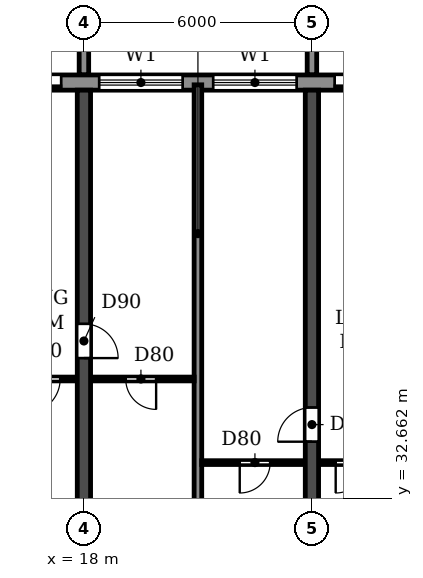
"""IFC4 building model, lengths in metres.
Left out: names, types, materials, properties, quantities, classifications, styles, units other than length and angle.
Written with IfcOpenShell. Run it as: python <this file> out.ifc"""

import sys

from ifc_helpers import new_model, si_unit, direction, frame, frame_2d, origin, place, context, subcontext, project, spatial, polyline, rectangle, outline, extrude, source, transform, mapped, element, fill, save


model = new_model("IFC4")
c1 = context("Model", 3, precision=1e-05, world=origin(), true_north=direction((0.0, 1.0)))
c2 = subcontext(c1, "Body", "Model", "MODEL_VIEW")
j1 = project(units=[si_unit("LENGTHUNIT", "METRE"), si_unit("PLANEANGLEUNIT", "RADIAN")], contexts=[c1])
p1 = place(None, origin())
s1 = spatial("IfcSite", under=j1, at=p1, CompositionType="ELEMENT")
p2 = place(p1, origin())
s2 = spatial("IfcBuilding", under=s1, at=p2, CompositionType="ELEMENT")
p3 = place(p2, frame((0.0, 0.0, 102.6)))
s3 = spatial("IfcBuildingStorey", under=s2, at=p3, CompositionType="ELEMENT", Elevation=102.6)
p4 = place(p3, frame((18.0, 30.525, 0.0), z_axis=(0.0, 0.0, 1.0), x_axis=(0.0, 1.0, 0.0)))
e1 = element("IfcWall", 1, at=p4, inside=s3, PredefinedType="SHEAR", context=c2, shape_type="SweptSolid", body=[
    extrude(rectangle(XDim=12.875, YDim=0.35, at=frame_2d((6.438, 0.0))), origin(), (0.0, 0.0, 1.0), 3.0),
])
p5 = place(p4, frame((5.825, 0.0, 0.0)))
e2 = element("IfcOpeningElement", 2, at=p5, cuts=e1, PredefinedType="OPENING", context=c2, shape_type="SweptSolid", body=[
    extrude(rectangle(XDim=0.9, YDim=2.1, at=frame_2d((0.45, 1.05))), frame((0.0, 0.185, 0.0), z_axis=(0.0, -1.0, 0.0), x_axis=(1.0, 0.0, 0.0)), (0.0, 0.0, 1.0), 0.37),
])
p6 = place(p3, frame((24.0, 30.525, 0.0), z_axis=(0.0, 0.0, 1.0), x_axis=(0.0, 1.0, 0.0)))
e3 = element("IfcWall", 3, at=p6, inside=s3, PredefinedType="SHEAR", context=c2, shape_type="SweptSolid", body=[
    extrude(rectangle(XDim=12.875, YDim=0.35, at=frame_2d((6.438, 0.0))), origin(), (0.0, 0.0, 1.0), 3.0),
])
p7 = place(p6, frame((3.625, 0.0, 0.0)))
e4 = element("IfcOpeningElement", 4, at=p7, cuts=e3, PredefinedType="OPENING", context=c2, shape_type="SweptSolid", body=[
    extrude(rectangle(XDim=0.9, YDim=2.1, at=frame_2d((0.45, 1.05))), frame((0.0, 0.185, 0.0), z_axis=(0.0, -1.0, 0.0), x_axis=(1.0, 0.0, 0.0)), (0.0, 0.0, 1.0), 0.37),
])
p8 = place(p3, frame((91.317, 43.6, 0.0), z_axis=(0.0, 0.0, 1.0), x_axis=(-1.0, 0.0, 0.0)))
e5 = element("IfcWall", 5, at=p8, inside=s3, PredefinedType="STANDARD", context=c2, shape_type="SweptSolid", body=[
    extrude(rectangle(XDim=80.634, YDim=0.4, at=frame_2d((40.317, 0.0))), origin(), (0.0, 0.0, 1.0), 3.0),
])
p9 = place(p8, frame((76.717, 0.0, 0.9)))
e6 = element("IfcOpeningElement", 6, at=p9, cuts=e5, PredefinedType="OPENING", context=c2, shape_type="SweptSolid", body=[
    extrude(rectangle(XDim=2.2, YDim=1.5, at=frame_2d((1.1, 0.75))), frame((0.0, 0.21, 0.0), z_axis=(0.0, -1.0, 0.0), x_axis=(1.0, 0.0, 0.0)), (0.0, 0.0, 1.0), 0.42),
])
p10 = place(p8, frame((73.917, 0.0, 0.0)))
e7 = element("IfcOpeningElement", 7, at=p10, cuts=e5, PredefinedType="OPENING", context=c2, shape_type="SweptSolid", body=[
    extrude(rectangle(XDim=1.8, YDim=2.4, at=frame_2d((0.9, 1.2))), frame((0.0, 0.21, 0.0), z_axis=(0.0, -1.0, 0.0), x_axis=(1.0, 0.0, 0.0)), (0.0, 0.0, 1.0), 0.42),
])
p11 = place(p8, frame((70.717, 0.0, 0.9)))
e8 = element("IfcOpeningElement", 8, at=p11, cuts=e5, PredefinedType="OPENING", context=c2, shape_type="SweptSolid", body=[
    extrude(rectangle(XDim=2.2, YDim=1.5, at=frame_2d((1.1, 0.75))), frame((0.0, 0.21, 0.0), z_axis=(0.0, -1.0, 0.0), x_axis=(1.0, 0.0, 0.0)), (0.0, 0.0, 1.0), 0.42),
])
p12 = place(p8, frame((67.717, 0.0, 0.9)))
e9 = element("IfcOpeningElement", 9, at=p12, cuts=e5, PredefinedType="OPENING", context=c2, shape_type="SweptSolid", body=[
    extrude(rectangle(XDim=2.2, YDim=1.5, at=frame_2d((1.1, 0.75))), frame((0.0, 0.21, 0.0), z_axis=(0.0, -1.0, 0.0), x_axis=(1.0, 0.0, 0.0)), (0.0, 0.0, 1.0), 0.42),
])
p13 = place(p8, frame((64.917, 0.0, 0.0)))
e10 = element("IfcOpeningElement", 10, at=p13, cuts=e5, PredefinedType="OPENING", context=c2, shape_type="SweptSolid", body=[
    extrude(rectangle(XDim=1.8, YDim=2.4, at=frame_2d((0.9, 1.2))), frame((0.0, 0.21, 0.0), z_axis=(0.0, -1.0, 0.0), x_axis=(1.0, 0.0, 0.0)), (0.0, 0.0, 1.0), 0.42),
])
p14 = place(p8, frame((61.717, 0.0, 0.9)))
e11 = element("IfcOpeningElement", 11, at=p14, cuts=e5, PredefinedType="OPENING", context=c2, shape_type="SweptSolid", body=[
    extrude(rectangle(XDim=2.2, YDim=1.5, at=frame_2d((1.1, 0.75))), frame((0.0, 0.21, 0.0), z_axis=(0.0, -1.0, 0.0), x_axis=(1.0, 0.0, 0.0)), (0.0, 0.0, 1.0), 0.42),
])
p15 = place(p8, frame((58.717, 0.0, 0.9)))
e12 = element("IfcOpeningElement", 12, at=p15, cuts=e5, PredefinedType="OPENING", context=c2, shape_type="SweptSolid", body=[
    extrude(rectangle(XDim=2.2, YDim=1.5, at=frame_2d((1.1, 0.75))), frame((0.0, 0.21, 0.0), z_axis=(0.0, -1.0, 0.0), x_axis=(1.0, 0.0, 0.0)), (0.0, 0.0, 1.0), 0.42),
])
p16 = place(p8, frame((55.717, 0.0, 0.9)))
e13 = element("IfcOpeningElement", 13, at=p16, cuts=e5, PredefinedType="OPENING", context=c2, shape_type="SweptSolid", body=[
    extrude(rectangle(XDim=2.2, YDim=1.5, at=frame_2d((1.1, 0.75))), frame((0.0, 0.21, 0.0), z_axis=(0.0, -1.0, 0.0), x_axis=(1.0, 0.0, 0.0)), (0.0, 0.0, 1.0), 0.42),
])
p17 = place(p8, frame((52.717, 0.0, 0.9)))
e14 = element("IfcOpeningElement", 14, at=p17, cuts=e5, PredefinedType="OPENING", context=c2, shape_type="SweptSolid", body=[
    extrude(rectangle(XDim=2.2, YDim=1.5, at=frame_2d((1.1, 0.75))), frame((0.0, 0.21, 0.0), z_axis=(0.0, -1.0, 0.0), x_axis=(1.0, 0.0, 0.0)), (0.0, 0.0, 1.0), 0.42),
])
p18 = place(p8, frame((49.917, 0.0, 0.0)))
e15 = element("IfcOpeningElement", 15, at=p18, cuts=e5, PredefinedType="OPENING", context=c2, shape_type="SweptSolid", body=[
    extrude(rectangle(XDim=1.8, YDim=2.4, at=frame_2d((0.9, 1.2))), frame((0.0, 0.21, 0.0), z_axis=(0.0, -1.0, 0.0), x_axis=(1.0, 0.0, 0.0)), (0.0, 0.0, 1.0), 0.42),
])
p19 = place(p8, frame((46.717, 0.0, 0.9)))
e16 = element("IfcOpeningElement", 16, at=p19, cuts=e5, PredefinedType="OPENING", context=c2, shape_type="SweptSolid", body=[
    extrude(rectangle(XDim=2.2, YDim=1.5, at=frame_2d((1.1, 0.75))), frame((0.0, 0.21, 0.0), z_axis=(0.0, -1.0, 0.0), x_axis=(1.0, 0.0, 0.0)), (0.0, 0.0, 1.0), 0.42),
])
p20 = place(p8, frame((43.917, 0.0, 0.0)))
e17 = element("IfcOpeningElement", 17, at=p20, cuts=e5, PredefinedType="OPENING", context=c2, shape_type="SweptSolid", body=[
    extrude(rectangle(XDim=1.8, YDim=2.4, at=frame_2d((0.9, 1.2))), frame((0.0, 0.21, 0.0), z_axis=(0.0, -1.0, 0.0), x_axis=(1.0, 0.0, 0.0)), (0.0, 0.0, 1.0), 0.42),
])
p21 = place(p8, frame((40.717, 0.0, 0.9)))
e18 = element("IfcOpeningElement", 18, at=p21, cuts=e5, PredefinedType="OPENING", context=c2, shape_type="SweptSolid", body=[
    extrude(rectangle(XDim=2.2, YDim=1.5, at=frame_2d((1.1, 0.75))), frame((0.0, 0.21, 0.0), z_axis=(0.0, -1.0, 0.0), x_axis=(1.0, 0.0, 0.0)), (0.0, 0.0, 1.0), 0.42),
])
p22 = place(p8, frame((37.717, 0.0, 0.9)))
e19 = element("IfcOpeningElement", 19, at=p22, cuts=e5, PredefinedType="OPENING", context=c2, shape_type="SweptSolid", body=[
    extrude(rectangle(XDim=2.2, YDim=1.5, at=frame_2d((1.1, 0.75))), frame((0.0, 0.21, 0.0), z_axis=(0.0, -1.0, 0.0), x_axis=(1.0, 0.0, 0.0)), (0.0, 0.0, 1.0), 0.42),
])
p23 = place(p8, frame((34.917, 0.0, 0.0)))
e20 = element("IfcOpeningElement", 20, at=p23, cuts=e5, PredefinedType="OPENING", context=c2, shape_type="SweptSolid", body=[
    extrude(rectangle(XDim=1.8, YDim=2.4, at=frame_2d((0.9, 1.2))), frame((0.0, 0.21, 0.0), z_axis=(0.0, -1.0, 0.0), x_axis=(1.0, 0.0, 0.0)), (0.0, 0.0, 1.0), 0.42),
])
p24 = place(p8, frame((31.717, 0.0, 0.9)))
e21 = element("IfcOpeningElement", 21, at=p24, cuts=e5, PredefinedType="OPENING", context=c2, shape_type="SweptSolid", body=[
    extrude(rectangle(XDim=2.2, YDim=1.5, at=frame_2d((1.1, 0.75))), frame((0.0, 0.21, 0.0), z_axis=(0.0, -1.0, 0.0), x_axis=(1.0, 0.0, 0.0)), (0.0, 0.0, 1.0), 0.42),
])
p25 = place(p8, frame((28.717, 0.0, 0.9)))
e22 = element("IfcOpeningElement", 22, at=p25, cuts=e5, PredefinedType="OPENING", context=c2, shape_type="SweptSolid", body=[
    extrude(rectangle(XDim=2.2, YDim=1.5, at=frame_2d((1.1, 0.75))), frame((0.0, 0.21, 0.0), z_axis=(0.0, -1.0, 0.0), x_axis=(1.0, 0.0, 0.0)), (0.0, 0.0, 1.0), 0.42),
])
p26 = place(p8, frame((25.917, 0.0, 0.0)))
e23 = element("IfcOpeningElement", 23, at=p26, cuts=e5, PredefinedType="OPENING", context=c2, shape_type="SweptSolid", body=[
    extrude(rectangle(XDim=1.8, YDim=2.4, at=frame_2d((0.9, 1.2))), frame((0.0, 0.21, 0.0), z_axis=(0.0, -1.0, 0.0), x_axis=(1.0, 0.0, 0.0)), (0.0, 0.0, 1.0), 0.42),
])
p27 = place(p8, frame((22.717, 0.0, 0.9)))
e24 = element("IfcOpeningElement", 24, at=p27, cuts=e5, PredefinedType="OPENING", context=c2, shape_type="SweptSolid", body=[
    extrude(rectangle(XDim=2.2, YDim=1.5, at=frame_2d((1.1, 0.75))), frame((0.0, 0.21, 0.0), z_axis=(0.0, -1.0, 0.0), x_axis=(1.0, 0.0, 0.0)), (0.0, 0.0, 1.0), 0.42),
])
p28 = place(p8, frame((19.717, 0.0, 0.9)))
e25 = element("IfcOpeningElement", 25, at=p28, cuts=e5, PredefinedType="OPENING", context=c2, shape_type="SweptSolid", body=[
    extrude(rectangle(XDim=2.2, YDim=1.5, at=frame_2d((1.1, 0.75))), frame((0.0, 0.21, 0.0), z_axis=(0.0, -1.0, 0.0), x_axis=(1.0, 0.0, 0.0)), (0.0, 0.0, 1.0), 0.42),
])
p29 = place(p8, frame((16.917, 0.0, 0.0)))
e26 = element("IfcOpeningElement", 26, at=p29, cuts=e5, PredefinedType="OPENING", context=c2, shape_type="SweptSolid", body=[
    extrude(rectangle(XDim=1.8, YDim=2.4, at=frame_2d((0.9, 1.2))), frame((0.0, 0.21, 0.0), z_axis=(0.0, -1.0, 0.0), x_axis=(1.0, 0.0, 0.0)), (0.0, 0.0, 1.0), 0.42),
])
p30 = place(p8, frame((13.717, 0.0, 0.9)))
e27 = element("IfcOpeningElement", 27, at=p30, cuts=e5, PredefinedType="OPENING", context=c2, shape_type="SweptSolid", body=[
    extrude(rectangle(XDim=2.2, YDim=1.5, at=frame_2d((1.1, 0.75))), frame((0.0, 0.21, 0.0), z_axis=(0.0, -1.0, 0.0), x_axis=(1.0, 0.0, 0.0)), (0.0, 0.0, 1.0), 0.42),
])
p31 = place(p8, frame((10.917, 0.0, 0.0)))
e28 = element("IfcOpeningElement", 28, at=p31, cuts=e5, PredefinedType="OPENING", context=c2, shape_type="SweptSolid", body=[
    extrude(rectangle(XDim=1.8, YDim=2.4, at=frame_2d((0.9, 1.2))), frame((0.0, 0.21, 0.0), z_axis=(0.0, -1.0, 0.0), x_axis=(1.0, 0.0, 0.0)), (0.0, 0.0, 1.0), 0.42),
])
p32 = place(p8, frame((7.717, 0.0, 0.9)))
e29 = element("IfcOpeningElement", 29, at=p32, cuts=e5, PredefinedType="OPENING", context=c2, shape_type="SweptSolid", body=[
    extrude(rectangle(XDim=2.2, YDim=1.5, at=frame_2d((1.1, 0.75))), frame((0.0, 0.21, 0.0), z_axis=(0.0, -1.0, 0.0), x_axis=(1.0, 0.0, 0.0)), (0.0, 0.0, 1.0), 0.42),
])
p33 = place(p8, frame((4.717, 0.0, 0.9)))
e30 = element("IfcOpeningElement", 30, at=p33, cuts=e5, PredefinedType="OPENING", context=c2, shape_type="SweptSolid", body=[
    extrude(rectangle(XDim=2.2, YDim=1.5, at=frame_2d((1.1, 0.75))), frame((0.0, 0.21, 0.0), z_axis=(0.0, -1.0, 0.0), x_axis=(1.0, 0.0, 0.0)), (0.0, 0.0, 1.0), 0.42),
])
p34 = place(p8, frame((1.917, 0.0, 0.0)))
e31 = element("IfcOpeningElement", 31, at=p34, cuts=e5, PredefinedType="OPENING", context=c2, shape_type="SweptSolid", body=[
    extrude(rectangle(XDim=1.8, YDim=2.4, at=frame_2d((0.9, 1.2))), frame((0.0, 0.21, 0.0), z_axis=(0.0, -1.0, 0.0), x_axis=(1.0, 0.0, 0.0)), (0.0, 0.0, 1.0), 0.42),
])
m1 = source(origin(), c2, "Body", "SweptSolid", [
    extrude(outline(polyline([(0.0, 0.0), (0.25, 0.0), (0.25, 3.1), (0.0, 3.1), (0.0, 0.0)])), origin(), (0.0, 0.0, 1.0), 3.1),
])
for number, where in (
    (32, (17.875, 43.8, 0.0)),
    (33, (23.875, 43.8, 0.0)),
):
    element("IfcWall", number, at=place(p3, frame(where)), inside=s3, PredefinedType="STANDARD", context=c2, shape_type="MappedRepresentation", body=[
        mapped(m1, transform((0.0, 0.0, 0.0))),
    ])
p35 = place(p3, frame((21.0, 30.535, 0.0), z_axis=(0.0, 0.0, 1.0), x_axis=(0.0, 1.0, 0.0)))
e34 = element("IfcWall", 34, at=p35, inside=s3, PredefinedType="PARTITIONING", context=c2, shape_type="SweptSolid", body=[
    extrude(rectangle(XDim=13.005, YDim=0.2, at=frame_2d((6.502, 0.0))), origin(), (0.0, 0.0, 1.0), 3.0),
])
p36 = place(p3, frame((21.1, 33.6, 0.0), z_axis=(0.0, 0.0, 1.0), x_axis=(1.0, 0.0, 0.0)))
e35 = element("IfcWall", 35, at=p36, inside=s3, PredefinedType="PARTITIONING", context=c2, shape_type="SweptSolid", body=[
    extrude(rectangle(XDim=2.715, YDim=0.1, at=frame_2d((1.357, 0.0))), origin(), (0.0, 0.0, 1.0), 3.0),
])
p37 = place(p36, frame((1.0, 0.0, 0.0)))
e36 = element("IfcOpeningElement", 36, at=p37, cuts=e35, PredefinedType="OPENING", context=c2, shape_type="SweptSolid", body=[
    extrude(rectangle(XDim=0.8, YDim=2.1, at=frame_2d((0.4, 1.05))), frame((0.0, 0.06, 0.0), z_axis=(0.0, -1.0, 0.0), x_axis=(1.0, 0.0, 0.0)), (0.0, 0.0, 1.0), 0.12),
])
p38 = place(p3, frame((24.185, 33.6, 0.0), z_axis=(0.0, 0.0, 1.0), x_axis=(1.0, 0.0, 0.0)))
e37 = element("IfcWall", 37, at=p38, inside=s3, PredefinedType="PARTITIONING", context=c2, shape_type="SweptSolid", body=[
    extrude(rectangle(XDim=1.915, YDim=0.1, at=frame_2d((0.958, 0.0))), origin(), (0.0, 0.0, 1.0), 3.0),
])
p39 = place(p38, frame((0.44, 0.0, 0.0)))
e38 = element("IfcOpeningElement", 38, at=p39, cuts=e37, PredefinedType="OPENING", context=c2, shape_type="SweptSolid", body=[
    extrude(rectangle(XDim=0.8, YDim=2.1, at=frame_2d((0.4, 1.05))), frame((0.0, 0.06, 0.0), z_axis=(0.0, -1.0, 0.0), x_axis=(1.0, 0.0, 0.0)), (0.0, 0.0, 1.0), 0.12),
])
p40 = place(p3, frame((15.8, 35.8, 0.0), z_axis=(0.0, 0.0, 1.0), x_axis=(1.0, 0.0, 0.0)))
e39 = element("IfcWall", 39, at=p40, inside=s3, PredefinedType="PARTITIONING", context=c2, shape_type="SweptSolid", body=[
    extrude(rectangle(XDim=2.015, YDim=0.1, at=frame_2d((1.007, 0.0))), origin(), (0.0, 0.0, 1.0), 3.0),
])
p41 = place(p40, frame((0.675, 0.0, 0.0)))
e40 = element("IfcOpeningElement", 40, at=p41, cuts=e39, PredefinedType="OPENING", context=c2, shape_type="SweptSolid", body=[
    extrude(rectangle(XDim=0.9, YDim=2.1, at=frame_2d((0.45, 1.05))), frame((0.0, 0.06, 0.0), z_axis=(0.0, -1.0, 0.0), x_axis=(1.0, 0.0, 0.0)), (0.0, 0.0, 1.0), 0.12),
])
p42 = place(p3, frame((18.185, 35.8, 0.0), z_axis=(0.0, 0.0, 1.0), x_axis=(1.0, 0.0, 0.0)))
e41 = element("IfcWall", 41, at=p42, inside=s3, PredefinedType="PARTITIONING", context=c2, shape_type="SweptSolid", body=[
    extrude(rectangle(XDim=2.715, YDim=0.1, at=frame_2d((1.357, 0.0))), origin(), (0.0, 0.0, 1.0), 3.0),
])
p43 = place(p42, frame((0.915, 0.0, 0.0)))
e42 = element("IfcOpeningElement", 42, at=p43, cuts=e41, PredefinedType="OPENING", context=c2, shape_type="SweptSolid", body=[
    extrude(rectangle(XDim=0.8, YDim=2.1, at=frame_2d((0.4, 1.05))), frame((0.0, 0.06, 0.0), z_axis=(0.0, -1.0, 0.0), x_axis=(1.0, 0.0, 0.0)), (0.0, 0.0, 1.0), 0.12),
])
p44 = place(p10, origin())
e43 = element("IfcDoor", 43, at=p44, inside=s3, OperationType="DOUBLE_DOOR_SLIDING", PredefinedType="DOOR", context=c2, shape_type="SweptSolid", body=[
    extrude(rectangle(XDim=1.8, YDim=2.4, at=frame_2d((0.9, 1.2))), frame((0.0, 0.025, 0.0), z_axis=(0.0, -1.0, 0.0), x_axis=(1.0, 0.0, 0.0)), (0.0, 0.0, 1.0), 0.05),
])
fill(e7, e43)
p45 = place(p11, origin())
e44 = element("IfcWindow", 44, at=p45, inside=s3, PartitioningType="DOUBLE_PANEL_HORIZONTAL", PredefinedType="WINDOW", context=c2, shape_type="SweptSolid", body=[
    extrude(rectangle(XDim=2.2, YDim=1.5, at=frame_2d((1.1, 0.75))), frame((0.0, 0.03, 0.0), z_axis=(0.0, -1.0, 0.0), x_axis=(1.0, 0.0, 0.0)), (0.0, 0.0, 1.0), 0.06),
])
fill(e8, e44)
p46 = place(p12, origin())
e45 = element("IfcWindow", 45, at=p46, inside=s3, PartitioningType="DOUBLE_PANEL_HORIZONTAL", PredefinedType="WINDOW", context=c2, shape_type="SweptSolid", body=[
    extrude(rectangle(XDim=2.2, YDim=1.5, at=frame_2d((1.1, 0.75))), frame((0.0, 0.03, 0.0), z_axis=(0.0, -1.0, 0.0), x_axis=(1.0, 0.0, 0.0)), (0.0, 0.0, 1.0), 0.06),
])
fill(e9, e45)
p47 = place(p13, origin())
e46 = element("IfcDoor", 46, at=p47, inside=s3, OperationType="DOUBLE_DOOR_SLIDING", PredefinedType="DOOR", context=c2, shape_type="SweptSolid", body=[
    extrude(rectangle(XDim=1.8, YDim=2.4, at=frame_2d((0.9, 1.2))), frame((0.0, 0.025, 0.0), z_axis=(0.0, -1.0, 0.0), x_axis=(1.0, 0.0, 0.0)), (0.0, 0.0, 1.0), 0.05),
])
fill(e10, e46)
p48 = place(p43, frame((0.8, 0.0, 0.0), z_axis=(0.0, 0.0, 1.0), x_axis=(-1.0, 0.0, 0.0)))
e47 = element("IfcDoor", 47, at=p48, inside=s3, OperationType="SINGLE_SWING_LEFT", PredefinedType="DOOR", context=c2, shape_type="SweptSolid", body=[
    extrude(rectangle(XDim=0.8, YDim=2.1, at=frame_2d((0.4, 1.05))), frame((0.0, 0.025, 0.0), z_axis=(0.0, -1.0, 0.0), x_axis=(1.0, 0.0, 0.0)), (0.0, 0.0, 1.0), 0.05),
])
fill(e42, e47)
p49 = place(p41, frame((0.9, 0.0, 0.0), z_axis=(0.0, 0.0, 1.0), x_axis=(-1.0, 0.0, 0.0)))
e48 = element("IfcDoor", 48, at=p49, inside=s3, OperationType="SINGLE_SWING_RIGHT", PredefinedType="DOOR", context=c2, shape_type="SweptSolid", body=[
    extrude(rectangle(XDim=0.9, YDim=2.1, at=frame_2d((0.45, 1.05))), frame((0.0, 0.025, 0.0), z_axis=(0.0, -1.0, 0.0), x_axis=(1.0, 0.0, 0.0)), (0.0, 0.0, 1.0), 0.05),
])
fill(e40, e48)
p50 = place(p5, frame((0.9, 0.0, 0.0), z_axis=(0.0, 0.0, 1.0), x_axis=(-1.0, 0.0, 0.0)))
e49 = element("IfcDoor", 49, at=p50, inside=s3, OperationType="SINGLE_SWING_RIGHT", PredefinedType="DOOR", context=c2, shape_type="SweptSolid", body=[
    extrude(rectangle(XDim=0.9, YDim=2.1, at=frame_2d((0.45, 1.05))), frame((0.0, 0.025, 0.0), z_axis=(0.0, -1.0, 0.0), x_axis=(1.0, 0.0, 0.0)), (0.0, 0.0, 1.0), 0.05),
])
fill(e2, e49)
p51 = place(p37, frame((0.8, 0.0, 0.0), z_axis=(0.0, 0.0, 1.0), x_axis=(-1.0, 0.0, 0.0)))
e50 = element("IfcDoor", 50, at=p51, inside=s3, OperationType="SINGLE_SWING_RIGHT", PredefinedType="DOOR", context=c2, shape_type="SweptSolid", body=[
    extrude(rectangle(XDim=0.8, YDim=2.1, at=frame_2d((0.4, 1.05))), frame((0.0, 0.025, 0.0), z_axis=(0.0, -1.0, 0.0), x_axis=(1.0, 0.0, 0.0)), (0.0, 0.0, 1.0), 0.05),
])
fill(e36, e50)
p52 = place(p7, origin())
e51 = element("IfcDoor", 51, at=p52, inside=s3, OperationType="SINGLE_SWING_LEFT", PredefinedType="DOOR", context=c2, shape_type="SweptSolid", body=[
    extrude(rectangle(XDim=0.9, YDim=2.1, at=frame_2d((0.45, 1.05))), frame((0.0, 0.025, 0.0), z_axis=(0.0, -1.0, 0.0), x_axis=(1.0, 0.0, 0.0)), (0.0, 0.0, 1.0), 0.05),
])
fill(e4, e51)
p53 = place(p39, frame((0.8, 0.0, 0.0), z_axis=(0.0, 0.0, 1.0), x_axis=(-1.0, 0.0, 0.0)))
e52 = element("IfcDoor", 52, at=p53, inside=s3, OperationType="SINGLE_SWING_RIGHT", PredefinedType="DOOR", context=c2, shape_type="SweptSolid", body=[
    extrude(rectangle(XDim=0.8, YDim=2.1, at=frame_2d((0.4, 1.05))), frame((0.0, 0.025, 0.0), z_axis=(0.0, -1.0, 0.0), x_axis=(1.0, 0.0, 0.0)), (0.0, 0.0, 1.0), 0.05),
])
fill(e38, e52)
save(model, sys.argv[1])
